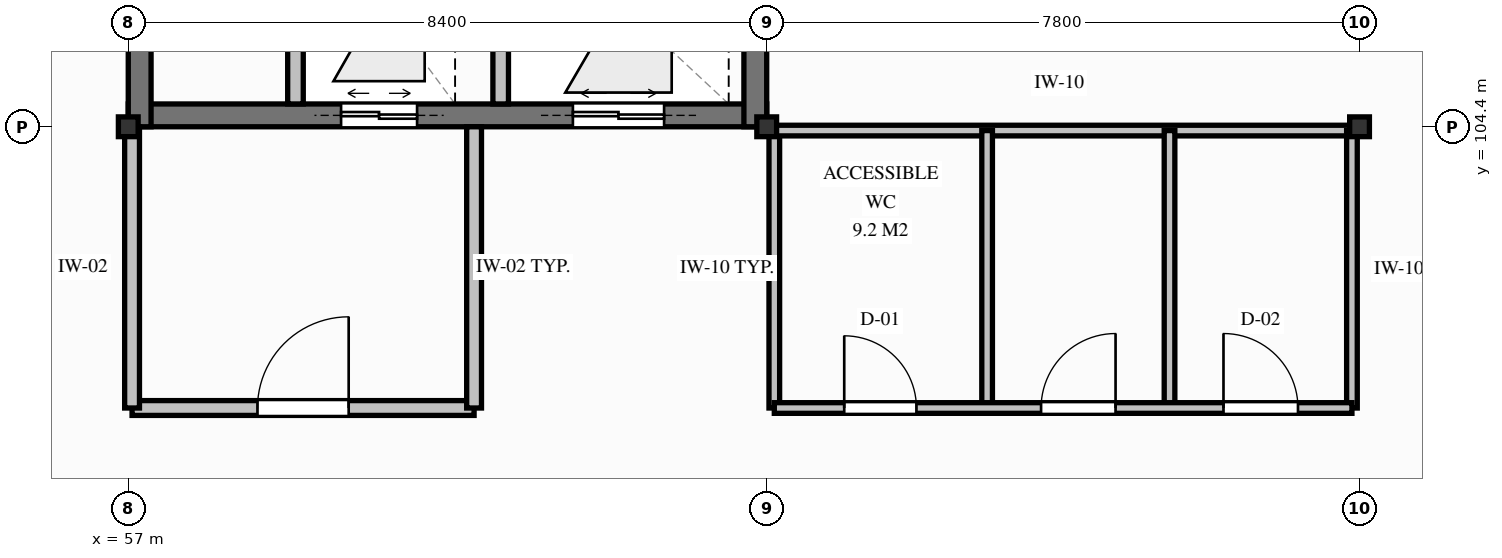
"""IFC4 building model, lengths in metres.
Left out: names, types, materials, properties, quantities, classifications, styles, units other than length and angle.
Written with IfcOpenShell. Run it as: python <this file> out.ifc"""

import sys

from ifc_helpers import new_model, si_unit, direction, frame, frame_2d, origin, origin_2d, place, context, subcontext, project, spatial, rectangle, i_section, extrude, element, fill, save


model = new_model("IFC4")
c1 = context("Model", 3, precision=1e-05, world=origin(), true_north=direction((0.0, 1.0)))
c2 = subcontext(c1, "Body", "Model", "MODEL_VIEW")
j1 = project(units=[si_unit("LENGTHUNIT", "METRE"), si_unit("PLANEANGLEUNIT", "RADIAN")], contexts=[c1])
p1 = place(None, origin())
s1 = spatial("IfcSite", under=j1, at=p1, CompositionType="ELEMENT")
p2 = place(p1, origin())
s2 = spatial("IfcBuilding", under=s1, at=p2, CompositionType="ELEMENT")
p3 = place(p2, frame((0.0, 0.0, 21.3)))
s3 = spatial("IfcBuildingStorey", under=s2, at=p3, CompositionType="ELEMENT", Elevation=21.3)
p4 = place(p3, frame((57.0, 104.55, 0.0), z_axis=(0.0, 0.0, 1.0), x_axis=(1.0, 0.0, 0.0)))
e1 = element("IfcWall", 1, at=p4, inside=s3, PredefinedType="SHEAR", context=c2, shape_type="SweptSolid", body=[
    extrude(rectangle(XDim=8.4, YDim=0.3, at=frame_2d((4.2, 0.0))), origin(), (0.0, 0.0, 1.0), 4.05),
])
p5 = place(p4, frame((2.8, 0.0, 0.0)))
e2 = element("IfcOpeningElement", 2, at=p5, cuts=e1, PredefinedType="OPENING", context=c2, shape_type="SweptSolid", body=[
    extrude(rectangle(XDim=1.0, YDim=2.1, at=frame_2d((0.5, 1.05))), frame((0.0, 0.16, 0.0), z_axis=(0.0, -1.0, 0.0), x_axis=(1.0, 0.0, 0.0)), (0.0, 0.0, 1.0), 0.32),
])
p6 = place(p4, frame((5.85, 0.0, 0.0)))
e3 = element("IfcOpeningElement", 3, at=p6, cuts=e1, PredefinedType="OPENING", context=c2, shape_type="SweptSolid", body=[
    extrude(rectangle(XDim=1.2, YDim=2.15, at=frame_2d((0.6, 1.075))), frame((0.0, 0.16, 0.0), z_axis=(0.0, -1.0, 0.0), x_axis=(1.0, 0.0, 0.0)), (0.0, 0.0, 1.0), 0.32),
])
p7 = place(p3, frame((57.15, 104.4, 0.0), z_axis=(0.0, 0.0, 1.0), x_axis=(0.0, 1.0, 0.0)))
e4 = element("IfcWall", 4, at=p7, inside=s3, PredefinedType="SHEAR", context=c2, shape_type="SweptSolid", body=[
    extrude(rectangle(XDim=7.2, YDim=0.3, at=frame_2d((3.6, 0.0))), origin(), (0.0, 0.0, 1.0), 4.05),
])
p8 = place(p7, frame((4.2, 0.0, 0.0)))
e5 = element("IfcOpeningElement", 5, at=p8, cuts=e4, PredefinedType="OPENING", context=c2, shape_type="SweptSolid", body=[
    extrude(rectangle(XDim=1.1, YDim=2.15, at=frame_2d((0.55, 1.075))), frame((0.0, 0.16, 0.0), z_axis=(0.0, -1.0, 0.0), x_axis=(1.0, 0.0, 0.0)), (0.0, 0.0, 1.0), 0.32),
])
p9 = place(p3, frame((65.25, 104.4, 0.0), z_axis=(0.0, 0.0, 1.0), x_axis=(0.0, 1.0, 0.0)))
e6 = element("IfcWall", 6, at=p9, inside=s3, PredefinedType="SHEAR", context=c2, shape_type="SweptSolid", body=[
    extrude(rectangle(XDim=7.2, YDim=0.3, at=frame_2d((3.6, 0.0))), origin(), (0.0, 0.0, 1.0), 4.05),
])
for number, where, z_axis, x_axis in (
    (7, (57.0, 104.4, 0.0), (0.0, 0.0, 1.0), (1.0, 0.0, 0.0)),
    (8, (65.4, 104.4, 0.0), (0.0, 0.0, 1.0), (1.0, 0.0, 0.0)),
    (9, (73.2, 104.4, 0.0), (0.0, 0.0, 1.0), (1.0, 0.0, 0.0)),
):
    element("IfcColumn", number, at=place(p3, frame(where, z_axis=z_axis, x_axis=x_axis)), inside=s3, PredefinedType="COLUMN", context=c2, shape_type="SweptSolid", body=[
        extrude(i_section(OverallWidth=0.26, OverallDepth=0.26, WebThickness=0.01, FlangeThickness=0.018, FilletRadius=0.024, at=origin_2d()), origin(), (0.0, 0.0, 1.0), 4.05),
    ])
for number, where, z_axis, x_axis in (
    (10, (59.2, 104.7, 0.0), (0.0, 0.0, 1.0), (0.0, 1.0, 0.0)),
    (11, (61.9, 104.7, 0.0), (0.0, 0.0, 1.0), (0.0, 1.0, 0.0)),
):
    element("IfcWall", number, at=place(p3, frame(where, z_axis=z_axis, x_axis=x_axis)), inside=s3, PredefinedType="PARTITIONING", context=c2, shape_type="SweptSolid", body=[
        extrude(rectangle(XDim=2.7, YDim=0.205, at=frame_2d((1.35, 0.0))), origin(), (0.0, 0.0, 1.0), 3.508),
    ])
p10 = place(p3, frame((65.5, 100.7, 0.0), z_axis=(0.0, 0.0, 1.0), x_axis=(0.0, 1.0, 0.0)))
e12 = element("IfcWall", 12, at=p10, inside=s3, PredefinedType="PARTITIONING", context=c2, shape_type="SweptSolid", body=[
    extrude(rectangle(XDim=3.68, YDim=0.14, at=frame_2d((1.84, 0.0))), origin(), (0.0, 0.0, 1.0), 3.438),
])
p11 = place(p3, frame((65.4, 104.35, 0.0), z_axis=(0.0, 0.0, 1.0), x_axis=(1.0, 0.0, 0.0)))
e13 = element("IfcWall", 13, at=p11, inside=s3, PredefinedType="PARTITIONING", context=c2, shape_type="SweptSolid", body=[
    extrude(rectangle(XDim=7.7, YDim=0.14, at=frame_2d((3.85, 0.0))), origin(), (0.0, 0.0, 1.0), 3.438),
])
for number, where, z_axis, x_axis in (
    (14, (73.1, 100.7, 0.0), (0.0, 0.0, 1.0), (0.0, 1.0, 0.0)),
    (15, (68.3, 100.7, 0.0), (0.0, 0.0, 1.0), (0.0, 1.0, 0.0)),
    (16, (70.7, 100.7, 0.0), (0.0, 0.0, 1.0), (0.0, 1.0, 0.0)),
):
    element("IfcWall", number, at=place(p3, frame(where, z_axis=z_axis, x_axis=x_axis)), inside=s3, PredefinedType="PARTITIONING", context=c2, shape_type="SweptSolid", body=[
        extrude(rectangle(XDim=3.65, YDim=0.14, at=frame_2d((1.825, 0.0))), origin(), (0.0, 0.0, 1.0), 3.448),
    ])
p12 = place(p3, frame((65.5, 100.7, 0.0), z_axis=(0.0, 0.0, 1.0), x_axis=(1.0, 0.0, 0.0)))
e17 = element("IfcWall", 17, at=p12, inside=s3, PredefinedType="PARTITIONING", context=c2, shape_type="SweptSolid", body=[
    extrude(rectangle(XDim=7.6, YDim=0.14, at=frame_2d((3.8, 0.0))), origin(), (0.0, 0.0, 1.0), 3.438),
])
p13 = place(p12, frame((0.92, 0.0, 0.0)))
e18 = element("IfcOpeningElement", 18, at=p13, cuts=e17, PredefinedType="OPENING", context=c2, shape_type="SweptSolid", body=[
    extrude(rectangle(XDim=0.95, YDim=2.12, at=frame_2d((0.475, 1.06))), frame((0.0, 0.08, 0.0), z_axis=(0.0, -1.0, 0.0), x_axis=(1.0, 0.0, 0.0)), (0.0, 0.0, 1.0), 0.16),
])
p14 = place(p12, frame((3.51, 0.0, 0.0)))
e19 = element("IfcOpeningElement", 19, at=p14, cuts=e17, PredefinedType="OPENING", context=c2, shape_type="SweptSolid", body=[
    extrude(rectangle(XDim=0.98, YDim=2.14, at=frame_2d((0.49, 1.07))), frame((0.0, 0.08, 0.0), z_axis=(0.0, -1.0, 0.0), x_axis=(1.0, 0.0, 0.0)), (0.0, 0.0, 1.0), 0.16),
])
p15 = place(p12, frame((5.91, 0.0, 0.0)))
e20 = element("IfcOpeningElement", 20, at=p15, cuts=e17, PredefinedType="OPENING", context=c2, shape_type="SweptSolid", body=[
    extrude(rectangle(XDim=0.98, YDim=2.14, at=frame_2d((0.49, 1.07))), frame((0.0, 0.08, 0.0), z_axis=(0.0, -1.0, 0.0), x_axis=(1.0, 0.0, 0.0)), (0.0, 0.0, 1.0), 0.16),
])
p16 = place(p3, frame((57.05, 100.7, 0.0), z_axis=(0.0, 0.0, 1.0), x_axis=(1.0, 0.0, 0.0)))
e21 = element("IfcWall", 21, at=p16, inside=s3, PredefinedType="PARTITIONING", context=c2, shape_type="SweptSolid", body=[
    extrude(rectangle(XDim=4.5, YDim=0.195, at=frame_2d((2.25, 0.0))), origin(), (0.0, 0.0, 1.0), 3.328),
])
p17 = place(p16, frame((1.65, 0.0, 0.0)))
e22 = element("IfcOpeningElement", 22, at=p17, cuts=e21, PredefinedType="OPENING", context=c2, shape_type="SweptSolid", body=[
    extrude(rectangle(XDim=1.2, YDim=2.15, at=frame_2d((0.6, 1.075))), frame((0.0, 0.107, 0.0), z_axis=(0.0, -1.0, 0.0), x_axis=(1.0, 0.0, 0.0)), (0.0, 0.0, 1.0), 0.215),
])
p18 = place(p3, frame((61.55, 100.7, 0.0), z_axis=(0.0, 0.0, 1.0), x_axis=(0.0, 1.0, 0.0)))
e23 = element("IfcWall", 23, at=p18, inside=s3, PredefinedType="PARTITIONING", context=c2, shape_type="SweptSolid", body=[
    extrude(rectangle(XDim=3.7, YDim=0.195, at=frame_2d((1.85, 0.0))), origin(), (0.0, 0.0, 1.0), 3.508),
])
p19 = place(p3, frame((57.05, 100.7, 0.0), z_axis=(0.0, 0.0, 1.0), x_axis=(0.0, 1.0, 0.0)))
e24 = element("IfcWall", 24, at=p19, inside=s3, PredefinedType="PARTITIONING", context=c2, shape_type="SweptSolid", body=[
    extrude(rectangle(XDim=3.7, YDim=0.195, at=frame_2d((1.85, 0.0))), origin(), (0.0, 0.0, 1.0), 3.328),
])
p20 = place(p5, origin())
e25 = element("IfcDoor", 25, at=p20, inside=s3, OperationType="DOUBLE_DOOR_SLIDING", PredefinedType="DOOR", context=c2, shape_type="SweptSolid", body=[
    extrude(rectangle(XDim=1.0, YDim=2.1, at=frame_2d((0.5, 1.05))), frame((0.0, 0.025, 0.0), z_axis=(0.0, -1.0, 0.0), x_axis=(1.0, 0.0, 0.0)), (0.0, 0.0, 1.0), 0.05),
])
fill(e2, e25)
p21 = place(p6, origin())
e26 = element("IfcDoor", 26, at=p21, inside=s3, OperationType="DOUBLE_DOOR_SLIDING", PredefinedType="DOOR", context=c2, shape_type="SweptSolid", body=[
    extrude(rectangle(XDim=1.2, YDim=2.15, at=frame_2d((0.6, 1.075))), frame((0.0, 0.025, 0.0), z_axis=(0.0, -1.0, 0.0), x_axis=(1.0, 0.0, 0.0)), (0.0, 0.0, 1.0), 0.05),
])
fill(e3, e26)
p22 = place(p13, origin())
e27 = element("IfcDoor", 27, at=p22, inside=s3, OperationType="SINGLE_SWING_LEFT", PredefinedType="DOOR", context=c2, shape_type="SweptSolid", body=[
    extrude(rectangle(XDim=0.95, YDim=2.12, at=frame_2d((0.475, 1.06))), frame((0.0, 0.025, 0.0), z_axis=(0.0, -1.0, 0.0), x_axis=(1.0, 0.0, 0.0)), (0.0, 0.0, 1.0), 0.05),
])
fill(e18, e27)
p23 = place(p14, origin())
e28 = element("IfcDoor", 28, at=p23, inside=s3, OperationType="SINGLE_SWING_RIGHT", PredefinedType="DOOR", context=c2, shape_type="SweptSolid", body=[
    extrude(rectangle(XDim=0.98, YDim=2.14, at=frame_2d((0.49, 1.07))), frame((0.0, 0.025, 0.0), z_axis=(0.0, -1.0, 0.0), x_axis=(1.0, 0.0, 0.0)), (0.0, 0.0, 1.0), 0.05),
])
fill(e19, e28)
p24 = place(p15, origin())
e29 = element("IfcDoor", 29, at=p24, inside=s3, OperationType="SINGLE_SWING_LEFT", PredefinedType="DOOR", context=c2, shape_type="SweptSolid", body=[
    extrude(rectangle(XDim=0.98, YDim=2.14, at=frame_2d((0.49, 1.07))), frame((0.0, 0.025, 0.0), z_axis=(0.0, -1.0, 0.0), x_axis=(1.0, 0.0, 0.0)), (0.0, 0.0, 1.0), 0.05),
])
fill(e20, e29)
p25 = place(p17, origin())
e30 = element("IfcDoor", 30, at=p25, inside=s3, OperationType="SINGLE_SWING_RIGHT", PredefinedType="DOOR", context=c2, shape_type="SweptSolid", body=[
    extrude(rectangle(XDim=1.2, YDim=2.15, at=frame_2d((0.6, 1.075))), frame((0.0, 0.025, 0.0), z_axis=(0.0, -1.0, 0.0), x_axis=(1.0, 0.0, 0.0)), (0.0, 0.0, 1.0), 0.05),
])
fill(e22, e30)
save(model, sys.argv[1])
